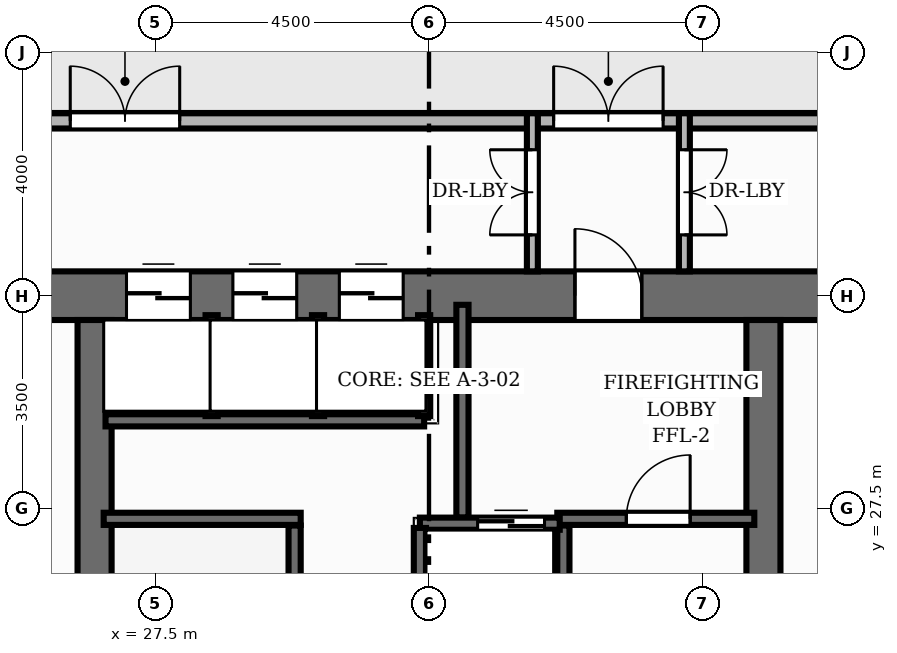
"""IFC4 building model, lengths in metres.
Left out: names, types, materials, properties, quantities, classifications, styles, units other than length and angle.
Written with IfcOpenShell. Run it as: python <this file> out.ifc"""

import sys

from ifc_helpers import new_model, si_unit, direction, frame, frame_2d, origin, place, context, subcontext, project, spatial, rectangle, extrude, element, fill, save


model = new_model("IFC4")
c1 = context("Model", 3, precision=1e-05, world=origin(), true_north=direction((0.0, 1.0)))
c2 = subcontext(c1, "Body", "Model", "MODEL_VIEW")
j1 = project(units=[si_unit("LENGTHUNIT", "METRE"), si_unit("PLANEANGLEUNIT", "RADIAN")], contexts=[c1])
p1 = place(None, origin())
s1 = spatial("IfcSite", under=j1, at=p1, CompositionType="ELEMENT")
p2 = place(p1, origin())
s2 = spatial("IfcBuilding", under=s1, at=p2, CompositionType="ELEMENT")
p3 = place(p2, origin())
s3 = spatial("IfcBuildingStorey", under=s2, at=p3, CompositionType="ELEMENT", Elevation=0.0)
p4 = place(p3, frame((22.6, 31.0, 0.0), z_axis=(0.0, 0.0, 1.0), x_axis=(1.0, 0.0, 0.0)))
e1 = element("IfcWall", 1, at=p4, inside=s3, PredefinedType="SHEAR", context=c2, shape_type="SweptSolid", body=[
    extrude(rectangle(XDim=18.8, YDim=0.8, at=frame_2d((9.4, 0.0))), origin(), (0.0, 0.0, 1.0), 4.0),
])
p5 = place(p4, frame((11.8, 0.0, 0.0)))
e2 = element("IfcOpeningElement", 2, at=p5, cuts=e1, PredefinedType="OPENING", context=c2, shape_type="SweptSolid", body=[
    extrude(rectangle(XDim=1.1, YDim=2.15, at=frame_2d((0.55, 1.075))), frame((0.0, 0.41, 0.0), z_axis=(0.0, -1.0, 0.0), x_axis=(1.0, 0.0, 0.0)), (0.0, 0.0, 1.0), 0.82),
])
p6 = place(p4, frame((4.425, 0.0, 0.0)))
e3 = element("IfcOpeningElement", 3, at=p6, cuts=e1, PredefinedType="OPENING", context=c2, shape_type="SweptSolid", body=[
    extrude(rectangle(XDim=1.05, YDim=2.15, at=frame_2d((0.525, 1.075))), frame((0.0, 0.41, 0.0), z_axis=(0.0, -1.0, 0.0), x_axis=(1.0, 0.0, 0.0)), (0.0, 0.0, 1.0), 0.82),
])
p7 = place(p4, frame((6.175, 0.0, 0.0)))
e4 = element("IfcOpeningElement", 4, at=p7, cuts=e1, PredefinedType="OPENING", context=c2, shape_type="SweptSolid", body=[
    extrude(rectangle(XDim=1.05, YDim=2.15, at=frame_2d((0.525, 1.075))), frame((0.0, 0.41, 0.0), z_axis=(0.0, -1.0, 0.0), x_axis=(1.0, 0.0, 0.0)), (0.0, 0.0, 1.0), 0.82),
])
p8 = place(p4, frame((7.925, 0.0, 0.0)))
e5 = element("IfcOpeningElement", 5, at=p8, cuts=e1, PredefinedType="OPENING", context=c2, shape_type="SweptSolid", body=[
    extrude(rectangle(XDim=1.05, YDim=2.15, at=frame_2d((0.525, 1.075))), frame((0.0, 0.41, 0.0), z_axis=(0.0, -1.0, 0.0), x_axis=(1.0, 0.0, 0.0)), (0.0, 0.0, 1.0), 0.82),
])
for number, where, z_axis, x_axis in (
    (6, (26.5, 17.4, 0.0), (0.0, 0.0, 1.0), (0.0, 1.0, 0.0)),
    (7, (37.5, 17.4, 0.0), (0.0, 0.0, 1.0), (0.0, 1.0, 0.0)),
):
    element("IfcWall", number, at=place(p3, frame(where, z_axis=z_axis, x_axis=x_axis)), inside=s3, PredefinedType="SHEAR", context=c2, shape_type="SweptSolid", body=[
        extrude(rectangle(XDim=13.2, YDim=0.56, at=frame_2d((6.6, 0.0))), origin(), (0.0, 0.0, 1.0), 4.0),
    ])
p9 = place(p3, frame((22.9, 33.875, 0.0), z_axis=(0.0, 0.0, 1.0), x_axis=(1.0, 0.0, 0.0)))
e8 = element("IfcWall", 8, at=p9, inside=s3, PredefinedType="SOLIDWALL", context=c2, shape_type="SweptSolid", body=[
    extrude(rectangle(XDim=18.2, YDim=0.25, at=frame_2d((9.1, 0.0))), origin(), (0.0, 0.0, 1.0), 3.72),
])
p10 = place(p9, frame((11.15, 0.0, 0.0)))
e9 = element("IfcOpeningElement", 9, at=p10, cuts=e8, PredefinedType="OPENING", context=c2, shape_type="SweptSolid", body=[
    extrude(rectangle(XDim=1.8, YDim=2.3, at=frame_2d((0.9, 1.15))), frame((0.0, 0.135, 0.0), z_axis=(0.0, -1.0, 0.0), x_axis=(1.0, 0.0, 0.0)), (0.0, 0.0, 1.0), 0.27),
])
p11 = place(p9, frame((3.2, 0.0, 0.0)))
e10 = element("IfcOpeningElement", 10, at=p11, cuts=e8, PredefinedType="OPENING", context=c2, shape_type="SweptSolid", body=[
    extrude(rectangle(XDim=1.8, YDim=2.3, at=frame_2d((0.9, 1.15))), frame((0.0, 0.135, 0.0), z_axis=(0.0, -1.0, 0.0), x_axis=(1.0, 0.0, 0.0)), (0.0, 0.0, 1.0), 0.27),
])
p12 = place(p3, frame((29.79, 20.78, 0.0), z_axis=(0.0, 0.0, 1.0), x_axis=(0.0, 1.0, 0.0)))
e11 = element("IfcWall", 11, at=p12, inside=s3, PredefinedType="SHEAR", context=c2, shape_type="SweptSolid", body=[
    extrude(rectangle(XDim=6.44, YDim=0.2, at=frame_2d((3.22, 0.0))), origin(), (0.0, 0.0, 1.0), 4.0),
])
p13 = place(p3, frame((26.65, 27.33, 0.0), z_axis=(0.0, 0.0, 1.0), x_axis=(1.0, 0.0, 0.0)))
e12 = element("IfcWall", 12, at=p13, inside=s3, PredefinedType="SHEAR", context=c2, shape_type="SweptSolid", body=[
    extrude(rectangle(XDim=3.24, YDim=0.2, at=frame_2d((1.62, 0.0))), origin(), (0.0, 0.0, 1.0), 4.0),
])
p14 = place(p3, frame((34.21, 20.78, 0.0), z_axis=(0.0, 0.0, 1.0), x_axis=(0.0, 1.0, 0.0)))
e13 = element("IfcWall", 13, at=p14, inside=s3, PredefinedType="SHEAR", context=c2, shape_type="SweptSolid", body=[
    extrude(rectangle(XDim=6.44, YDim=0.2, at=frame_2d((3.22, 0.0))), origin(), (0.0, 0.0, 1.0), 4.0),
])
p15 = place(p3, frame((34.11, 27.33, 0.0), z_axis=(0.0, 0.0, 1.0), x_axis=(1.0, 0.0, 0.0)))
e14 = element("IfcWall", 14, at=p15, inside=s3, PredefinedType="SHEAR", context=c2, shape_type="SweptSolid", body=[
    extrude(rectangle(XDim=3.24, YDim=0.2, at=frame_2d((1.62, 0.0))), origin(), (0.0, 0.0, 1.0), 4.0),
])
p16 = place(p15, frame((1.135, 0.0, 0.0)))
e15 = element("IfcOpeningElement", 15, at=p16, cuts=e14, PredefinedType="OPENING", context=c2, shape_type="SweptSolid", body=[
    extrude(rectangle(XDim=1.05, YDim=2.15, at=frame_2d((0.525, 1.075))), frame((0.0, 0.11, 0.0), z_axis=(0.0, -1.0, 0.0), x_axis=(1.0, 0.0, 0.0)), (0.0, 0.0, 1.0), 0.22),
])
p17 = place(p3, frame((32.55, 27.35, 0.0), z_axis=(0.0, 0.0, 1.0), x_axis=(0.0, 1.0, 0.0)))
e16 = element("IfcWall", 16, at=p17, inside=s3, PredefinedType="SHEAR", context=c2, shape_type="SweptSolid", body=[
    extrude(rectangle(XDim=3.5, YDim=0.2, at=frame_2d((1.75, 0.0))), origin(), (0.0, 0.0, 1.0), 4.0),
])
p18 = place(p3, frame((31.85, 27.25, 0.0), z_axis=(0.0, 0.0, 1.0), x_axis=(1.0, 0.0, 0.0)))
e17 = element("IfcWall", 17, at=p18, inside=s3, PredefinedType="SHEAR", context=c2, shape_type="SweptSolid", body=[
    extrude(rectangle(XDim=2.3, YDim=0.2, at=frame_2d((1.15, 0.0))), origin(), (0.0, 0.0, 1.0), 4.0),
])
p19 = place(p18, frame((0.95, 0.0, 0.0)))
e18 = element("IfcOpeningElement", 18, at=p19, cuts=e17, PredefinedType="OPENING", context=c2, shape_type="SweptSolid", body=[
    extrude(rectangle(XDim=1.1, YDim=2.15, at=frame_2d((0.55, 1.075))), frame((0.0, 0.11, 0.0), z_axis=(0.0, -1.0, 0.0), x_axis=(1.0, 0.0, 0.0)), (0.0, 0.0, 1.0), 0.22),
])
p20 = place(p3, frame((31.85, 25.47, 0.0), z_axis=(0.0, 0.0, 1.0), x_axis=(0.0, 1.0, 0.0)))
e19 = element("IfcWall", 19, at=p20, inside=s3, PredefinedType="SHEAR", context=c2, shape_type="SweptSolid", body=[
    extrude(rectangle(XDim=1.71, YDim=0.2, at=frame_2d((0.855, 0.0))), origin(), (0.0, 0.0, 1.0), 4.0),
])
p21 = place(p3, frame((26.68, 28.95, 0.0), z_axis=(0.0, 0.0, 1.0), x_axis=(1.0, 0.0, 0.0)))
e20 = element("IfcWall", 20, at=p21, inside=s3, PredefinedType="SHEAR", context=c2, shape_type="SweptSolid", body=[
    extrude(rectangle(XDim=5.24, YDim=0.2, at=frame_2d((2.62, 0.0))), origin(), (0.0, 0.0, 1.0), 4.0),
])
for number, where, z_axis, x_axis in (
    (21, (31.92, 29.02, 0.0), (0.0, 0.0, 1.0), (0.0, 1.0, 0.0)),
    (22, (28.425, 29.02, 0.0), (0.0, 0.0, 1.0), (0.0, 1.0, 0.0)),
    (23, (30.175, 29.02, 0.0), (0.0, 0.0, 1.0), (0.0, 1.0, 0.0)),
):
    element("IfcWall", number, at=place(p3, frame(where, z_axis=z_axis, x_axis=x_axis)), inside=s3, PredefinedType="SHEAR", context=c2, shape_type="SweptSolid", body=[
        extrude(rectangle(XDim=1.66, YDim=0.2, at=frame_2d((0.83, 0.0))), origin(), (0.0, 0.0, 1.0), 4.0),
    ])
p22 = place(p3, frame((36.2, 34.0, 0.0), z_axis=(0.0, 0.0, 1.0), x_axis=(0.0, -1.0, 0.0)))
e24 = element("IfcWall", 24, at=p22, inside=s3, PredefinedType="PARTITIONING", context=c2, shape_type="SweptSolid", body=[
    extrude(rectangle(XDim=2.6, YDim=0.18, at=frame_2d((1.3, 0.0))), origin(), (0.0, 0.0, 1.0), 3.715),
])
p23 = place(p22, frame((0.6, 0.0, 0.0)))
e25 = element("IfcOpeningElement", 25, at=p23, cuts=e24, PredefinedType="OPENING", context=c2, shape_type="SweptSolid", body=[
    extrude(rectangle(XDim=1.4, YDim=2.15, at=frame_2d((0.7, 1.075))), frame((0.0, 0.1, 0.0), z_axis=(0.0, -1.0, 0.0), x_axis=(1.0, 0.0, 0.0)), (0.0, 0.0, 1.0), 0.2),
])
p24 = place(p3, frame((33.7, 31.4, 0.0), z_axis=(0.0, 0.0, 1.0), x_axis=(0.0, 1.0, 0.0)))
e26 = element("IfcWall", 26, at=p24, inside=s3, PredefinedType="PARTITIONING", context=c2, shape_type="SweptSolid", body=[
    extrude(rectangle(XDim=2.6, YDim=0.18, at=frame_2d((1.3, 0.0))), origin(), (0.0, 0.0, 1.0), 3.715),
])
p25 = place(p24, frame((0.6, 0.0, 0.0)))
e27 = element("IfcOpeningElement", 27, at=p25, cuts=e26, PredefinedType="OPENING", context=c2, shape_type="SweptSolid", body=[
    extrude(rectangle(XDim=1.4, YDim=2.15, at=frame_2d((0.7, 1.075))), frame((0.0, 0.1, 0.0), z_axis=(0.0, -1.0, 0.0), x_axis=(1.0, 0.0, 0.0)), (0.0, 0.0, 1.0), 0.2),
])
p26 = place(p10, origin())
e28 = element("IfcDoor", 28, at=p26, inside=s3, OperationType="DOUBLE_DOOR_SINGLE_SWING", PredefinedType="DOOR", context=c2, shape_type="SweptSolid", body=[
    extrude(rectangle(XDim=1.8, YDim=2.3, at=frame_2d((0.9, 1.15))), frame((0.0, 0.025, 0.0), z_axis=(0.0, -1.0, 0.0), x_axis=(1.0, 0.0, 0.0)), (0.0, 0.0, 1.0), 0.05),
])
fill(e9, e28)
p27 = place(p11, origin())
e29 = element("IfcDoor", 29, at=p27, inside=s3, OperationType="DOUBLE_DOOR_SINGLE_SWING", PredefinedType="DOOR", context=c2, shape_type="SweptSolid", body=[
    extrude(rectangle(XDim=1.8, YDim=2.3, at=frame_2d((0.9, 1.15))), frame((0.0, 0.025, 0.0), z_axis=(0.0, -1.0, 0.0), x_axis=(1.0, 0.0, 0.0)), (0.0, 0.0, 1.0), 0.05),
])
fill(e10, e29)
p28 = place(p16, origin())
e30 = element("IfcDoor", 30, at=p28, inside=s3, OperationType="SINGLE_SWING_RIGHT", PredefinedType="DOOR", context=c2, shape_type="SweptSolid", body=[
    extrude(rectangle(XDim=1.05, YDim=2.15, at=frame_2d((0.525, 1.075))), frame((0.0, 0.025, 0.0), z_axis=(0.0, -1.0, 0.0), x_axis=(1.0, 0.0, 0.0)), (0.0, 0.0, 1.0), 0.05),
])
fill(e15, e30)
p29 = place(p5, origin())
e31 = element("IfcDoor", 31, at=p29, inside=s3, OperationType="SINGLE_SWING_LEFT", PredefinedType="DOOR", context=c2, shape_type="SweptSolid", body=[
    extrude(rectangle(XDim=1.1, YDim=2.15, at=frame_2d((0.55, 1.075))), frame((0.0, 0.025, 0.0), z_axis=(0.0, -1.0, 0.0), x_axis=(1.0, 0.0, 0.0)), (0.0, 0.0, 1.0), 0.05),
])
fill(e2, e31)
p30 = place(p19, origin())
e32 = element("IfcDoor", 32, at=p30, inside=s3, OperationType="DOUBLE_DOOR_SLIDING", PredefinedType="DOOR", context=c2, shape_type="SweptSolid", body=[
    extrude(rectangle(XDim=1.1, YDim=2.15, at=frame_2d((0.55, 1.075))), frame((0.0, 0.025, 0.0), z_axis=(0.0, -1.0, 0.0), x_axis=(1.0, 0.0, 0.0)), (0.0, 0.0, 1.0), 0.05),
])
fill(e18, e32)
p31 = place(p6, origin())
e33 = element("IfcDoor", 33, at=p31, inside=s3, OperationType="DOUBLE_DOOR_SLIDING", PredefinedType="DOOR", context=c2, shape_type="SweptSolid", body=[
    extrude(rectangle(XDim=1.05, YDim=2.15, at=frame_2d((0.525, 1.075))), frame((0.0, 0.025, 0.0), z_axis=(0.0, -1.0, 0.0), x_axis=(1.0, 0.0, 0.0)), (0.0, 0.0, 1.0), 0.05),
])
fill(e3, e33)
p32 = place(p7, origin())
e34 = element("IfcDoor", 34, at=p32, inside=s3, OperationType="DOUBLE_DOOR_SLIDING", PredefinedType="DOOR", context=c2, shape_type="SweptSolid", body=[
    extrude(rectangle(XDim=1.05, YDim=2.15, at=frame_2d((0.525, 1.075))), frame((0.0, 0.025, 0.0), z_axis=(0.0, -1.0, 0.0), x_axis=(1.0, 0.0, 0.0)), (0.0, 0.0, 1.0), 0.05),
])
fill(e4, e34)
p33 = place(p8, origin())
e35 = element("IfcDoor", 35, at=p33, inside=s3, OperationType="DOUBLE_DOOR_SLIDING", PredefinedType="DOOR", context=c2, shape_type="SweptSolid", body=[
    extrude(rectangle(XDim=1.05, YDim=2.15, at=frame_2d((0.525, 1.075))), frame((0.0, 0.025, 0.0), z_axis=(0.0, -1.0, 0.0), x_axis=(1.0, 0.0, 0.0)), (0.0, 0.0, 1.0), 0.05),
])
fill(e5, e35)
p34 = place(p23, origin())
e36 = element("IfcDoor", 36, at=p34, inside=s3, OperationType="DOUBLE_DOOR_SINGLE_SWING", PredefinedType="DOOR", context=c2, shape_type="SweptSolid", body=[
    extrude(rectangle(XDim=1.4, YDim=2.15, at=frame_2d((0.7, 1.075))), frame((0.0, 0.025, 0.0), z_axis=(0.0, -1.0, 0.0), x_axis=(1.0, 0.0, 0.0)), (0.0, 0.0, 1.0), 0.05),
])
fill(e25, e36)
p35 = place(p25, origin())
e37 = element("IfcDoor", 37, at=p35, inside=s3, OperationType="DOUBLE_DOOR_SINGLE_SWING", PredefinedType="DOOR", context=c2, shape_type="SweptSolid", body=[
    extrude(rectangle(XDim=1.4, YDim=2.15, at=frame_2d((0.7, 1.075))), frame((0.0, 0.025, 0.0), z_axis=(0.0, -1.0, 0.0), x_axis=(1.0, 0.0, 0.0)), (0.0, 0.0, 1.0), 0.05),
])
fill(e27, e37)
save(model, sys.argv[1])
